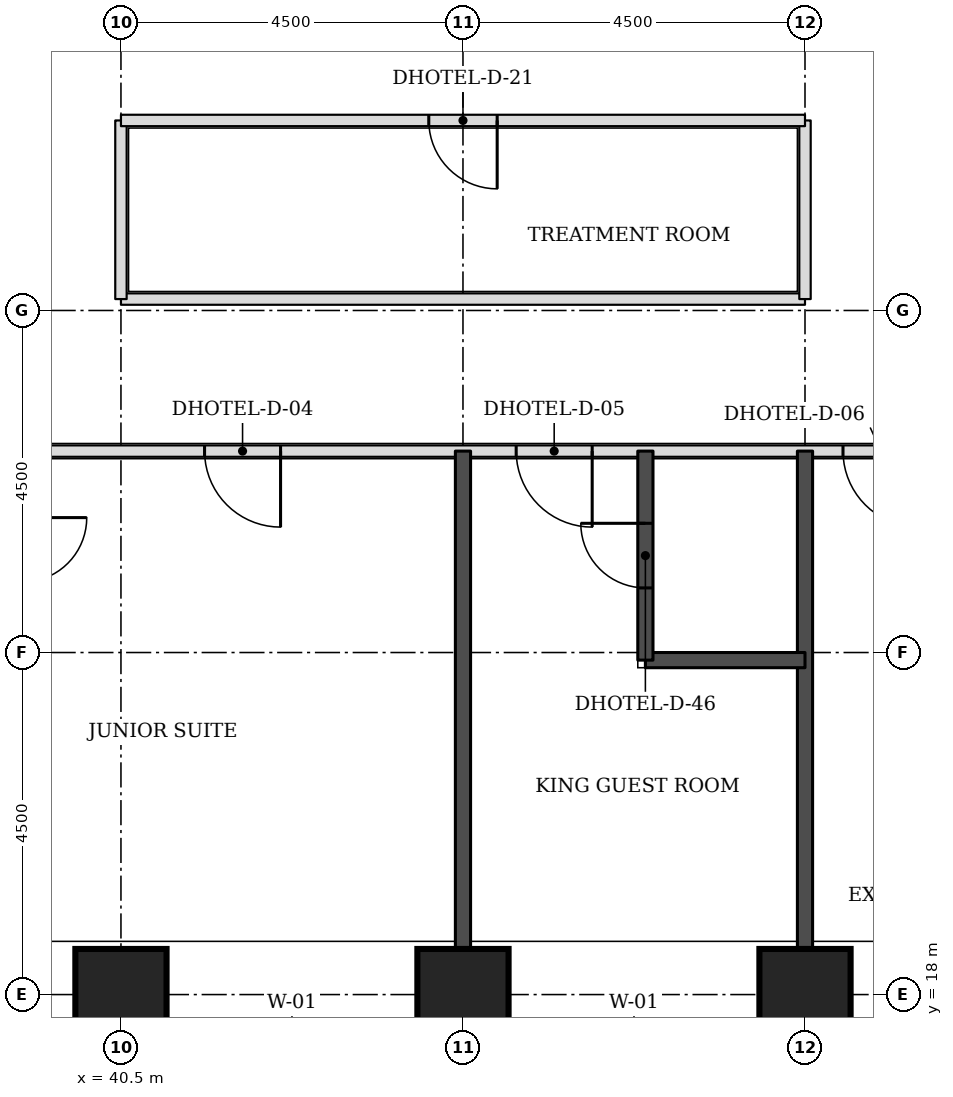
"""IFC4 building model, lengths in metres.
Left out: names, types, materials, properties, quantities, classifications, styles, units other than length and angle.
Written with IfcOpenShell. Run it as: python <this file> out.ifc"""

import sys

from ifc_helpers import new_model, si_unit, direction, frame, frame_2d, origin, origin_2d, place, context, subcontext, project, spatial, rectangle, extrude, element, fill, save


model = new_model("IFC4")
c1 = context("Model", 3, precision=1e-05, world=origin(), true_north=direction((0.0, 1.0)))
c2 = subcontext(c1, "Body", "Model", "MODEL_VIEW")
j1 = project(units=[si_unit("LENGTHUNIT", "METRE"), si_unit("PLANEANGLEUNIT", "RADIAN")], contexts=[c1])
p1 = place(None, origin())
s1 = spatial("IfcSite", under=j1, at=p1, CompositionType="ELEMENT")
p2 = place(p1, origin())
s2 = spatial("IfcBuilding", under=s1, at=p2, CompositionType="ELEMENT")
p3 = place(p2, frame((0.0, 0.0, 59.4)))
s3 = spatial("IfcBuildingStorey", under=s2, at=p3, CompositionType="ELEMENT", Elevation=59.4)
for number, where, z_axis, x_axis in (
    (1, (40.5, 18.0, 0.0), (0.0, 0.0, 1.0), (1.0, 0.0, 0.0)),
    (2, (45.0, 18.0, 0.0), (0.0, 0.0, 1.0), (1.0, 0.0, 0.0)),
    (3, (49.5, 18.0, 0.0), (0.0, 0.0, 1.0), (1.0, 0.0, 0.0)),
):
    element("IfcColumn", number, at=place(p3, frame(where, z_axis=z_axis, x_axis=x_axis)), inside=s3, PredefinedType="COLUMN", context=c2, shape_type="SweptSolid", body=[
        extrude(rectangle(XDim=1.2, YDim=1.2, at=origin_2d()), origin(), (0.0, 0.0, 1.0), 3.3),
    ])
p4 = place(p3, frame((19.15, 25.15, 0.0), z_axis=(0.0, 0.0, 1.0), x_axis=(1.0, 0.0, 0.0)))
e4 = element("IfcWall", 4, at=p4, inside=s3, PredefinedType="PARTITIONING", context=c2, shape_type="SweptSolid", body=[
    extrude(rectangle(XDim=32.35, YDim=0.15, at=frame_2d((16.175, 0.0))), origin(), (0.0, 0.0, 1.0), 3.08),
])
p5 = place(p4, frame((6.4, 0.0, 0.0)))
e5 = element("IfcOpeningElement", 5, at=p5, cuts=e4, PredefinedType="OPENING", context=c2, shape_type="SweptSolid", body=[
    extrude(rectangle(XDim=1.0, YDim=2.1, at=frame_2d((0.5, 1.05))), frame((0.0, 0.085, 0.0), z_axis=(0.0, -1.0, 0.0), x_axis=(1.0, 0.0, 0.0)), (0.0, 0.0, 1.0), 0.17),
])
p6 = place(p4, frame((10.5, 0.0, 0.0)))
e6 = element("IfcOpeningElement", 6, at=p6, cuts=e4, PredefinedType="OPENING", context=c2, shape_type="SweptSolid", body=[
    extrude(rectangle(XDim=1.0, YDim=2.1, at=frame_2d((0.5, 1.05))), frame((0.0, 0.085, 0.0), z_axis=(0.0, -1.0, 0.0), x_axis=(1.0, 0.0, 0.0)), (0.0, 0.0, 1.0), 0.17),
])
p7 = place(p4, frame((22.45, 0.0, 0.0)))
e7 = element("IfcOpeningElement", 7, at=p7, cuts=e4, PredefinedType="OPENING", context=c2, shape_type="SweptSolid", body=[
    extrude(rectangle(XDim=1.0, YDim=2.1, at=frame_2d((0.5, 1.05))), frame((0.0, 0.085, 0.0), z_axis=(0.0, -1.0, 0.0), x_axis=(1.0, 0.0, 0.0)), (0.0, 0.0, 1.0), 0.17),
])
p8 = place(p4, frame((26.55, 0.0, 0.0)))
e8 = element("IfcOpeningElement", 8, at=p8, cuts=e4, PredefinedType="OPENING", context=c2, shape_type="SweptSolid", body=[
    extrude(rectangle(XDim=1.0, YDim=2.1, at=frame_2d((0.5, 1.05))), frame((0.0, 0.085, 0.0), z_axis=(0.0, -1.0, 0.0), x_axis=(1.0, 0.0, 0.0)), (0.0, 0.0, 1.0), 0.17),
])
p9 = place(p4, frame((1.175, 0.0, 0.0)))
e9 = element("IfcOpeningElement", 9, at=p9, cuts=e4, PredefinedType="OPENING", context=c2, shape_type="SweptSolid", body=[
    extrude(rectangle(XDim=1.0, YDim=2.1, at=frame_2d((0.5, 1.05))), frame((0.0, 0.085, 0.0), z_axis=(0.0, -1.0, 0.0), x_axis=(1.0, 0.0, 0.0)), (0.0, 0.0, 1.0), 0.17),
])
p10 = place(p4, frame((30.85, 0.0, 0.0)))
e10 = element("IfcOpeningElement", 10, at=p10, cuts=e4, PredefinedType="OPENING", context=c2, shape_type="SweptSolid", body=[
    extrude(rectangle(XDim=1.0, YDim=2.1, at=frame_2d((0.5, 1.05))), frame((0.0, 0.085, 0.0), z_axis=(0.0, -1.0, 0.0), x_axis=(1.0, 0.0, 0.0)), (0.0, 0.0, 1.0), 0.17),
])
p11 = place(p3, frame((40.5, 27.15, 0.0), z_axis=(0.0, 0.0, 1.0), x_axis=(1.0, 0.0, 0.0)))
e11 = element("IfcWall", 11, at=p11, inside=s3, PredefinedType="PARTITIONING", context=c2, shape_type="SweptSolid", body=[
    extrude(rectangle(XDim=9.0, YDim=0.15, at=frame_2d((4.5, 0.0))), origin(), (0.0, 0.0, 1.0), 3.08),
])
for number, where, z_axis, x_axis in (
    (12, (40.5, 27.15, 0.0), (0.0, 0.0, 1.0), (0.0, 1.0, 0.0)),
    (13, (49.5, 27.15, 0.0), (0.0, 0.0, 1.0), (0.0, 1.0, 0.0)),
):
    element("IfcWall", number, at=place(p3, frame(where, z_axis=z_axis, x_axis=x_axis)), inside=s3, PredefinedType="PARTITIONING", context=c2, shape_type="SweptSolid", body=[
        extrude(rectangle(XDim=2.35, YDim=0.15, at=frame_2d((1.175, 0.0))), origin(), (0.0, 0.0, 1.0), 3.08),
    ])
p12 = place(p3, frame((40.5, 29.5, 0.0), z_axis=(0.0, 0.0, 1.0), x_axis=(1.0, 0.0, 0.0)))
e14 = element("IfcWall", 14, at=p12, inside=s3, PredefinedType="PARTITIONING", context=c2, shape_type="SweptSolid", body=[
    extrude(rectangle(XDim=9.0, YDim=0.15, at=frame_2d((4.5, 0.0))), origin(), (0.0, 0.0, 1.0), 3.08),
])
p13 = place(p12, frame((4.05, 0.0, 0.0)))
e15 = element("IfcOpeningElement", 15, at=p13, cuts=e14, PredefinedType="OPENING", context=c2, shape_type="SweptSolid", body=[
    extrude(rectangle(XDim=0.9, YDim=2.1, at=frame_2d((0.45, 1.05))), frame((0.0, 0.085, 0.0), z_axis=(0.0, -1.0, 0.0), x_axis=(1.0, 0.0, 0.0)), (0.0, 0.0, 1.0), 0.17),
])
for number, where, z_axis, x_axis in (
    (16, (45.0, 18.6, 0.0), (0.0, 0.0, 1.0), (0.0, 1.0, 0.0)),
    (17, (49.5, 18.6, 0.0), (0.0, 0.0, 1.0), (0.0, 1.0, 0.0)),
):
    element("IfcWall", number, at=place(p3, frame(where, z_axis=z_axis, x_axis=x_axis)), inside=s3, PredefinedType="SOLIDWALL", context=c2, shape_type="SweptSolid", body=[
        extrude(rectangle(XDim=6.55, YDim=0.2, at=frame_2d((3.275, 0.0))), origin(), (0.0, 0.0, 1.0), 3.08),
    ])
p14 = place(p3, frame((47.4, 22.4, 0.0), z_axis=(0.0, 0.0, 1.0), x_axis=(1.0, 0.0, 0.0)))
e18 = element("IfcWall", 18, at=p14, inside=s3, PredefinedType="SOLIDWALL", context=c2, shape_type="SweptSolid", body=[
    extrude(rectangle(XDim=2.1, YDim=0.2, at=frame_2d((1.05, 0.0))), origin(), (0.0, 0.0, 1.0), 3.08),
])
p15 = place(p3, frame((47.4, 22.4, 0.0), z_axis=(0.0, 0.0, 1.0), x_axis=(0.0, 1.0, 0.0)))
e19 = element("IfcWall", 19, at=p15, inside=s3, PredefinedType="SOLIDWALL", context=c2, shape_type="SweptSolid", body=[
    extrude(rectangle(XDim=2.75, YDim=0.2, at=frame_2d((1.375, 0.0))), origin(), (0.0, 0.0, 1.0), 3.08),
])
p16 = place(p15, frame((0.95, 0.0, 0.0)))
e20 = element("IfcOpeningElement", 20, at=p16, cuts=e19, PredefinedType="OPENING", context=c2, shape_type="SweptSolid", body=[
    extrude(rectangle(XDim=0.85, YDim=2.1, at=frame_2d((0.425, 1.05))), frame((0.0, 0.11, 0.0), z_axis=(0.0, -1.0, 0.0), x_axis=(1.0, 0.0, 0.0)), (0.0, 0.0, 1.0), 0.22),
])
p17 = place(p7, frame((1.0, 0.0, 0.0), z_axis=(0.0, 0.0, 1.0), x_axis=(-1.0, 0.0, 0.0)))
e21 = element("IfcDoor", 21, at=p17, inside=s3, OperationType="SINGLE_SWING_LEFT", PredefinedType="DOOR", context=c2, shape_type="SweptSolid", body=[
    extrude(rectangle(XDim=1.0, YDim=2.1, at=frame_2d((0.5, 1.05))), frame((0.0, 0.025, 0.0), z_axis=(0.0, -1.0, 0.0), x_axis=(1.0, 0.0, 0.0)), (0.0, 0.0, 1.0), 0.05),
])
fill(e7, e21)
p18 = place(p8, frame((1.0, 0.0, 0.0), z_axis=(0.0, 0.0, 1.0), x_axis=(-1.0, 0.0, 0.0)))
e22 = element("IfcDoor", 22, at=p18, inside=s3, OperationType="SINGLE_SWING_LEFT", PredefinedType="DOOR", context=c2, shape_type="SweptSolid", body=[
    extrude(rectangle(XDim=1.0, YDim=2.1, at=frame_2d((0.5, 1.05))), frame((0.0, 0.025, 0.0), z_axis=(0.0, -1.0, 0.0), x_axis=(1.0, 0.0, 0.0)), (0.0, 0.0, 1.0), 0.05),
])
fill(e8, e22)
p19 = place(p16, origin())
e23 = element("IfcDoor", 23, at=p19, inside=s3, OperationType="SINGLE_SWING_RIGHT", PredefinedType="DOOR", context=c2, shape_type="SweptSolid", body=[
    extrude(rectangle(XDim=0.85, YDim=2.1, at=frame_2d((0.425, 1.05))), frame((0.0, 0.025, 0.0), z_axis=(0.0, -1.0, 0.0), x_axis=(1.0, 0.0, 0.0)), (0.0, 0.0, 1.0), 0.05),
])
fill(e20, e23)
p20 = place(p10, frame((1.0, 0.0, 0.0), z_axis=(0.0, 0.0, 1.0), x_axis=(-1.0, 0.0, 0.0)))
e24 = element("IfcDoor", 24, at=p20, inside=s3, OperationType="SINGLE_SWING_LEFT", PredefinedType="DOOR", context=c2, shape_type="SweptSolid", body=[
    extrude(rectangle(XDim=1.0, YDim=2.1, at=frame_2d((0.5, 1.05))), frame((0.0, 0.025, 0.0), z_axis=(0.0, -1.0, 0.0), x_axis=(1.0, 0.0, 0.0)), (0.0, 0.0, 1.0), 0.05),
])
fill(e10, e24)
p21 = place(p13, frame((0.9, 0.0, 0.0), z_axis=(0.0, 0.0, 1.0), x_axis=(-1.0, 0.0, 0.0)))
e25 = element("IfcDoor", 25, at=p21, inside=s3, OperationType="SINGLE_SWING_LEFT", PredefinedType="DOOR", context=c2, shape_type="SweptSolid", body=[
    extrude(rectangle(XDim=0.9, YDim=2.1, at=frame_2d((0.45, 1.05))), frame((0.0, 0.025, 0.0), z_axis=(0.0, -1.0, 0.0), x_axis=(1.0, 0.0, 0.0)), (0.0, 0.0, 1.0), 0.05),
])
fill(e15, e25)
save(model, sys.argv[1])
